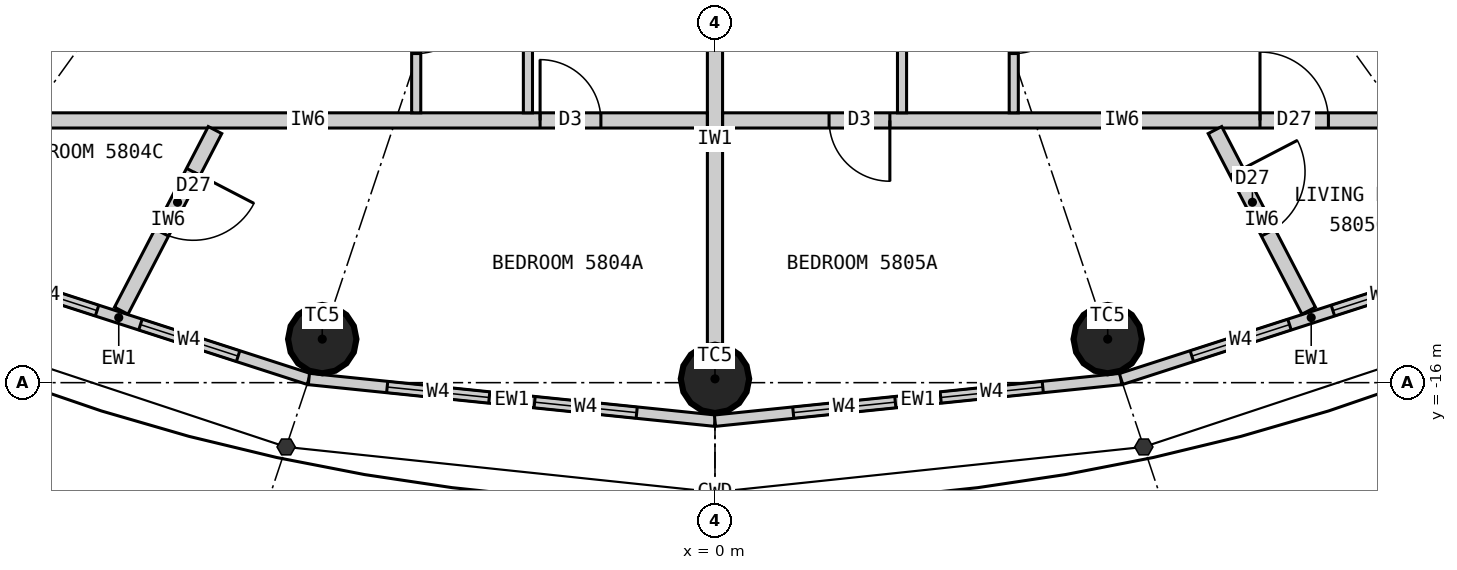
"""IFC4 building model, lengths in metres.
Left out: names, types, materials, properties, quantities, classifications, styles, units other than length and angle.
Written with IfcOpenShell. Run it as: python <this file> out.ifc"""

import sys

from ifc_helpers import new_model, si_unit, direction, frame, frame_2d, origin, origin_2d, place, context, subcontext, project, spatial, rectangle, circle, extrude, element, fill, save


model = new_model("IFC4")
c1 = context("Model", 3, precision=1e-05, world=origin(), true_north=direction((0.0, 1.0)))
c2 = subcontext(c1, "Body", "Model", "MODEL_VIEW")
j1 = project(units=[si_unit("LENGTHUNIT", "METRE"), si_unit("PLANEANGLEUNIT", "RADIAN")], contexts=[c1])
p1 = place(None, origin())
s1 = spatial("IfcSite", under=j1, at=p1, CompositionType="ELEMENT")
p2 = place(p1, origin())
s2 = spatial("IfcBuilding", under=s1, at=p2, CompositionType="ELEMENT")
p3 = place(p2, frame((0.0, 0.0, 216.0)))
s3 = spatial("IfcBuildingStorey", under=s2, at=p3, CompositionType="ELEMENT", Elevation=216.0)
for number, where, z_axis, x_axis in (
    (1, (-5.167, -15.427, 0.0), (0.0, 0.0, 1.0), (1.0, 0.0, 0.0)),
    (2, (0.0, -15.95, 0.0), (0.0, 0.0, 1.0), (1.0, 0.0, 0.0)),
    (3, (5.167, -15.427, 0.0), (0.0, 0.0, 1.0), (1.0, 0.0, 0.0)),
):
    element("IfcColumn", number, at=place(p3, frame(where, z_axis=z_axis, x_axis=x_axis)), inside=s3, PredefinedType="COLUMN", context=c2, shape_type="SweptSolid", body=[
        extrude(circle(Radius=0.45, at=origin_2d()), origin(), (0.0, 0.0, 1.0), 3.3),
    ])
p4 = place(p3, frame((-10.346, -14.336, 0.0), z_axis=(0.0, 0.0, 1.0), x_axis=(0.951644702515, -0.307200846638, 0.0)))
e4 = element("IfcWall", 4, at=p4, inside=s3, PredefinedType="ELEMENTEDWALL", context=c2, shape_type="SweptSolid", body=[
    extrude(rectangle(XDim=5.258, YDim=0.15, at=frame_2d((2.629, 0.0))), origin(), (0.0, 0.0, 1.0), 3.12),
])
p5 = place(p4, frame((0.979, 0.0, 0.9)))
e5 = element("IfcOpeningElement", 5, at=p5, cuts=e4, PredefinedType="OPENING", context=c2, shape_type="SweptSolid", body=[
    extrude(rectangle(XDim=1.35, YDim=1.9, at=frame_2d((0.675, 0.95))), frame((0.0, 0.085, 0.0), z_axis=(0.0, -1.0, 0.0), x_axis=(1.0, 0.0, 0.0)), (0.0, 0.0, 1.0), 0.17),
])
p6 = place(p4, frame((2.929, 0.0, 0.9)))
e6 = element("IfcOpeningElement", 6, at=p6, cuts=e4, PredefinedType="OPENING", context=c2, shape_type="SweptSolid", body=[
    extrude(rectangle(XDim=1.35, YDim=1.9, at=frame_2d((0.675, 0.95))), frame((0.0, 0.085, 0.0), z_axis=(0.0, -1.0, 0.0), x_axis=(1.0, 0.0, 0.0)), (0.0, 0.0, 1.0), 0.17),
])
p7 = place(p3, frame((-5.343, -15.952, 0.0), z_axis=(0.0, 0.0, 1.0), x_axis=(0.994774574972, -0.102095763818, 0.0)))
e7 = element("IfcWall", 7, at=p7, inside=s3, PredefinedType="ELEMENTEDWALL", context=c2, shape_type="SweptSolid", body=[
    extrude(rectangle(XDim=5.371, YDim=0.15, at=frame_2d((2.686, 0.0))), origin(), (0.0, 0.0, 1.0), 3.12),
])
p8 = place(p7, frame((1.035, 0.0, 0.9)))
e8 = element("IfcOpeningElement", 8, at=p8, cuts=e7, PredefinedType="OPENING", context=c2, shape_type="SweptSolid", body=[
    extrude(rectangle(XDim=1.35, YDim=1.9, at=frame_2d((0.675, 0.95))), frame((0.0, 0.085, 0.0), z_axis=(0.0, -1.0, 0.0), x_axis=(1.0, 0.0, 0.0)), (0.0, 0.0, 1.0), 0.17),
])
p9 = place(p7, frame((2.985, 0.0, 0.9)))
e9 = element("IfcOpeningElement", 9, at=p9, cuts=e7, PredefinedType="OPENING", context=c2, shape_type="SweptSolid", body=[
    extrude(rectangle(XDim=1.35, YDim=1.9, at=frame_2d((0.675, 0.95))), frame((0.0, 0.085, 0.0), z_axis=(0.0, -1.0, 0.0), x_axis=(1.0, 0.0, 0.0)), (0.0, 0.0, 1.0), 0.17),
])
p10 = place(p3, frame((0.0, -16.5, 0.0), z_axis=(0.0, 0.0, 1.0), x_axis=(0.994774574972, 0.102095763818, 0.0)))
e10 = element("IfcWall", 10, at=p10, inside=s3, PredefinedType="ELEMENTEDWALL", context=c2, shape_type="SweptSolid", body=[
    extrude(rectangle(XDim=5.371, YDim=0.15, at=frame_2d((2.686, 0.0))), origin(), (0.0, 0.0, 1.0), 3.12),
])
p11 = place(p10, frame((1.035, 0.0, 0.9)))
e11 = element("IfcOpeningElement", 11, at=p11, cuts=e10, PredefinedType="OPENING", context=c2, shape_type="SweptSolid", body=[
    extrude(rectangle(XDim=1.35, YDim=1.9, at=frame_2d((0.675, 0.95))), frame((0.0, 0.085, 0.0), z_axis=(0.0, -1.0, 0.0), x_axis=(1.0, 0.0, 0.0)), (0.0, 0.0, 1.0), 0.17),
])
p12 = place(p10, frame((2.985, 0.0, 0.9)))
e12 = element("IfcOpeningElement", 12, at=p12, cuts=e10, PredefinedType="OPENING", context=c2, shape_type="SweptSolid", body=[
    extrude(rectangle(XDim=1.35, YDim=1.9, at=frame_2d((0.675, 0.95))), frame((0.0, 0.085, 0.0), z_axis=(0.0, -1.0, 0.0), x_axis=(1.0, 0.0, 0.0)), (0.0, 0.0, 1.0), 0.17),
])
p13 = place(p3, frame((5.343, -15.952, 0.0), z_axis=(0.0, 0.0, 1.0), x_axis=(0.951644702515, 0.307200846638, 0.0)))
e13 = element("IfcWall", 13, at=p13, inside=s3, PredefinedType="ELEMENTEDWALL", context=c2, shape_type="SweptSolid", body=[
    extrude(rectangle(XDim=5.258, YDim=0.15, at=frame_2d((2.629, 0.0))), origin(), (0.0, 0.0, 1.0), 3.12),
])
p14 = place(p13, frame((0.979, 0.0, 0.9)))
e14 = element("IfcOpeningElement", 14, at=p14, cuts=e13, PredefinedType="OPENING", context=c2, shape_type="SweptSolid", body=[
    extrude(rectangle(XDim=1.35, YDim=1.9, at=frame_2d((0.675, 0.95))), frame((0.0, 0.085, 0.0), z_axis=(0.0, -1.0, 0.0), x_axis=(1.0, 0.0, 0.0)), (0.0, 0.0, 1.0), 0.17),
])
p15 = place(p13, frame((2.929, 0.0, 0.9)))
e15 = element("IfcOpeningElement", 15, at=p15, cuts=e13, PredefinedType="OPENING", context=c2, shape_type="SweptSolid", body=[
    extrude(rectangle(XDim=1.35, YDim=1.9, at=frame_2d((0.675, 0.95))), frame((0.0, 0.085, 0.0), z_axis=(0.0, -1.0, 0.0), x_axis=(1.0, 0.0, 0.0)), (0.0, 0.0, 1.0), 0.17),
])
p16 = place(p3, frame((0.0, -10.1, 0.0), z_axis=(0.0, 0.0, 1.0), x_axis=(0.0, -1.0, 0.0)))
e16 = element("IfcWall", 16, at=p16, inside=s3, PredefinedType="PARTITIONING", context=c2, shape_type="SweptSolid", body=[
    extrude(rectangle(XDim=5.4, YDim=0.2, at=frame_2d((2.7, 0.0))), origin(), (0.0, 0.0, 1.0), 2.42),
])
p17 = place(p3, frame((-10.609, -12.55, 0.0), z_axis=(0.0, 0.0, 1.0), x_axis=(1.0, 0.0, 0.0)))
e17 = element("IfcWall", 17, at=p17, inside=s3, PredefinedType="PARTITIONING", context=c2, shape_type="SweptSolid", body=[
    extrude(rectangle(XDim=10.508, YDim=0.2, at=frame_2d((5.254, 0.0))), origin(), (0.0, 0.0, 1.0), 3.12),
])
p18 = place(p17, frame((8.308, 0.0, 0.0)))
e18 = element("IfcOpeningElement", 18, at=p18, cuts=e17, PredefinedType="OPENING", context=c2, shape_type="SweptSolid", body=[
    extrude(rectangle(XDim=0.8, YDim=2.1, at=frame_2d((0.4, 1.05))), frame((0.0, 0.11, 0.0), z_axis=(0.0, -1.0, 0.0), x_axis=(1.0, 0.0, 0.0)), (0.0, 0.0, 1.0), 0.22),
])
p19 = place(p3, frame((-6.578, -12.677, 0.0), z_axis=(0.0, 0.0, 1.0), x_axis=(-0.460620531465, -0.887597164255, 0.0)))
e19 = element("IfcWall", 19, at=p19, inside=s3, PredefinedType="PARTITIONING", context=c2, shape_type="SweptSolid", body=[
    extrude(rectangle(XDim=2.678, YDim=0.2, at=frame_2d((1.339, 0.0))), origin(), (0.0, 0.0, 1.0), 3.12),
])
p20 = place(p19, frame((0.62, 0.0, 0.0)))
e20 = element("IfcOpeningElement", 20, at=p20, cuts=e19, PredefinedType="OPENING", context=c2, shape_type="SweptSolid", body=[
    extrude(rectangle(XDim=0.9, YDim=2.1, at=frame_2d((0.45, 1.05))), frame((0.0, 0.11, 0.0), z_axis=(0.0, -1.0, 0.0), x_axis=(1.0, 0.0, 0.0)), (0.0, 0.0, 1.0), 0.22),
])
p21 = place(p3, frame((-3.931, -10.1, 0.0), z_axis=(0.0, 0.0, 1.0), x_axis=(0.0, -1.0, 0.0)))
e21 = element("IfcWall", 21, at=p21, inside=s3, PredefinedType="PARTITIONING", context=c2, shape_type="SweptSolid", body=[
    extrude(rectangle(XDim=2.35, YDim=0.12, at=frame_2d((1.175, 0.0))), origin(), (0.0, 0.0, 1.0), 3.12),
])
p22 = place(p21, frame((0.77, 0.0, 0.0)))
e22 = element("IfcOpeningElement", 22, at=p22, cuts=e21, PredefinedType="OPENING", context=c2, shape_type="SweptSolid", body=[
    extrude(rectangle(XDim=0.8, YDim=2.1, at=frame_2d((0.4, 1.05))), frame((0.0, 0.07, 0.0), z_axis=(0.0, -1.0, 0.0), x_axis=(1.0, 0.0, 0.0)), (0.0, 0.0, 1.0), 0.14),
])
p23 = place(p3, frame((-2.461, -10.1, 0.0), z_axis=(0.0, 0.0, 1.0), x_axis=(0.0, -1.0, 0.0)))
e23 = element("IfcWall", 23, at=p23, inside=s3, PredefinedType="PARTITIONING", context=c2, shape_type="SweptSolid", body=[
    extrude(rectangle(XDim=2.35, YDim=0.12, at=frame_2d((1.175, 0.0))), origin(), (0.0, 0.0, 1.0), 3.12),
])
p24 = place(p3, frame((0.101, -12.55, 0.0), z_axis=(0.0, 0.0, 1.0), x_axis=(1.0, 0.0, 0.0)))
e24 = element("IfcWall", 24, at=p24, inside=s3, PredefinedType="PARTITIONING", context=c2, shape_type="SweptSolid", body=[
    extrude(rectangle(XDim=10.508, YDim=0.2, at=frame_2d((5.254, 0.0))), origin(), (0.0, 0.0, 1.0), 3.12),
])
p25 = place(p24, frame((1.4, 0.0, 0.0)))
e25 = element("IfcOpeningElement", 25, at=p25, cuts=e24, PredefinedType="OPENING", context=c2, shape_type="SweptSolid", body=[
    extrude(rectangle(XDim=0.8, YDim=2.1, at=frame_2d((0.4, 1.05))), frame((0.0, 0.11, 0.0), z_axis=(0.0, -1.0, 0.0), x_axis=(1.0, 0.0, 0.0)), (0.0, 0.0, 1.0), 0.22),
])
p26 = place(p24, frame((7.07, 0.0, 0.0)))
e26 = element("IfcOpeningElement", 26, at=p26, cuts=e24, PredefinedType="OPENING", context=c2, shape_type="SweptSolid", body=[
    extrude(rectangle(XDim=0.9, YDim=2.1, at=frame_2d((0.45, 1.05))), frame((0.0, 0.11, 0.0), z_axis=(0.0, -1.0, 0.0), x_axis=(1.0, 0.0, 0.0)), (0.0, 0.0, 1.0), 0.22),
])
p27 = place(p3, frame((6.578, -12.677, 0.0), z_axis=(0.0, 0.0, 1.0), x_axis=(0.460620531465, -0.887597164255, 0.0)))
e27 = element("IfcWall", 27, at=p27, inside=s3, PredefinedType="PARTITIONING", context=c2, shape_type="SweptSolid", body=[
    extrude(rectangle(XDim=2.678, YDim=0.2, at=frame_2d((1.339, 0.0))), origin(), (0.0, 0.0, 1.0), 3.12),
])
p28 = place(p27, frame((0.62, 0.0, 0.0)))
e28 = element("IfcOpeningElement", 28, at=p28, cuts=e27, PredefinedType="OPENING", context=c2, shape_type="SweptSolid", body=[
    extrude(rectangle(XDim=0.9, YDim=2.1, at=frame_2d((0.45, 1.05))), frame((0.0, 0.11, 0.0), z_axis=(0.0, -1.0, 0.0), x_axis=(1.0, 0.0, 0.0)), (0.0, 0.0, 1.0), 0.22),
])
p29 = place(p3, frame((2.461, -10.1, 0.0), z_axis=(0.0, 0.0, 1.0), x_axis=(0.0, -1.0, 0.0)))
e29 = element("IfcWall", 29, at=p29, inside=s3, PredefinedType="PARTITIONING", context=c2, shape_type="SweptSolid", body=[
    extrude(rectangle(XDim=2.35, YDim=0.12, at=frame_2d((1.175, 0.0))), origin(), (0.0, 0.0, 1.0), 3.12),
])
p30 = place(p3, frame((3.931, -10.1, 0.0), z_axis=(0.0, 0.0, 1.0), x_axis=(0.0, -1.0, 0.0)))
e30 = element("IfcWall", 30, at=p30, inside=s3, PredefinedType="PARTITIONING", context=c2, shape_type="SweptSolid", body=[
    extrude(rectangle(XDim=2.35, YDim=0.12, at=frame_2d((1.175, 0.0))), origin(), (0.0, 0.0, 1.0), 3.12),
])
p31 = place(p30, frame((0.77, 0.0, 0.0)))
e31 = element("IfcOpeningElement", 31, at=p31, cuts=e30, PredefinedType="OPENING", context=c2, shape_type="SweptSolid", body=[
    extrude(rectangle(XDim=0.8, YDim=2.1, at=frame_2d((0.4, 1.05))), frame((0.0, 0.07, 0.0), z_axis=(0.0, -1.0, 0.0), x_axis=(1.0, 0.0, 0.0)), (0.0, 0.0, 1.0), 0.14),
])
p32 = place(p5, origin())
e32 = element("IfcWindow", 32, at=p32, inside=s3, PartitioningType="SINGLE_PANEL", PredefinedType="WINDOW", context=c2, shape_type="SweptSolid", body=[
    extrude(rectangle(XDim=1.35, YDim=1.9, at=frame_2d((0.675, 0.95))), frame((0.0, 0.03, 0.0), z_axis=(0.0, -1.0, 0.0), x_axis=(1.0, 0.0, 0.0)), (0.0, 0.0, 1.0), 0.06),
])
fill(e5, e32)
p33 = place(p6, origin())
e33 = element("IfcWindow", 33, at=p33, inside=s3, PartitioningType="SINGLE_PANEL", PredefinedType="WINDOW", context=c2, shape_type="SweptSolid", body=[
    extrude(rectangle(XDim=1.35, YDim=1.9, at=frame_2d((0.675, 0.95))), frame((0.0, 0.03, 0.0), z_axis=(0.0, -1.0, 0.0), x_axis=(1.0, 0.0, 0.0)), (0.0, 0.0, 1.0), 0.06),
])
fill(e6, e33)
p34 = place(p8, origin())
e34 = element("IfcWindow", 34, at=p34, inside=s3, PartitioningType="SINGLE_PANEL", PredefinedType="WINDOW", context=c2, shape_type="SweptSolid", body=[
    extrude(rectangle(XDim=1.35, YDim=1.9, at=frame_2d((0.675, 0.95))), frame((0.0, 0.03, 0.0), z_axis=(0.0, -1.0, 0.0), x_axis=(1.0, 0.0, 0.0)), (0.0, 0.0, 1.0), 0.06),
])
fill(e8, e34)
p35 = place(p9, origin())
e35 = element("IfcWindow", 35, at=p35, inside=s3, PartitioningType="SINGLE_PANEL", PredefinedType="WINDOW", context=c2, shape_type="SweptSolid", body=[
    extrude(rectangle(XDim=1.35, YDim=1.9, at=frame_2d((0.675, 0.95))), frame((0.0, 0.03, 0.0), z_axis=(0.0, -1.0, 0.0), x_axis=(1.0, 0.0, 0.0)), (0.0, 0.0, 1.0), 0.06),
])
fill(e9, e35)
p36 = place(p11, origin())
e36 = element("IfcWindow", 36, at=p36, inside=s3, PartitioningType="SINGLE_PANEL", PredefinedType="WINDOW", context=c2, shape_type="SweptSolid", body=[
    extrude(rectangle(XDim=1.35, YDim=1.9, at=frame_2d((0.675, 0.95))), frame((0.0, 0.03, 0.0), z_axis=(0.0, -1.0, 0.0), x_axis=(1.0, 0.0, 0.0)), (0.0, 0.0, 1.0), 0.06),
])
fill(e11, e36)
p37 = place(p12, origin())
e37 = element("IfcWindow", 37, at=p37, inside=s3, PartitioningType="SINGLE_PANEL", PredefinedType="WINDOW", context=c2, shape_type="SweptSolid", body=[
    extrude(rectangle(XDim=1.35, YDim=1.9, at=frame_2d((0.675, 0.95))), frame((0.0, 0.03, 0.0), z_axis=(0.0, -1.0, 0.0), x_axis=(1.0, 0.0, 0.0)), (0.0, 0.0, 1.0), 0.06),
])
fill(e12, e37)
p38 = place(p14, origin())
e38 = element("IfcWindow", 38, at=p38, inside=s3, PartitioningType="SINGLE_PANEL", PredefinedType="WINDOW", context=c2, shape_type="SweptSolid", body=[
    extrude(rectangle(XDim=1.35, YDim=1.9, at=frame_2d((0.675, 0.95))), frame((0.0, 0.03, 0.0), z_axis=(0.0, -1.0, 0.0), x_axis=(1.0, 0.0, 0.0)), (0.0, 0.0, 1.0), 0.06),
])
fill(e14, e38)
p39 = place(p15, origin())
e39 = element("IfcWindow", 39, at=p39, inside=s3, PartitioningType="SINGLE_PANEL", PredefinedType="WINDOW", context=c2, shape_type="SweptSolid", body=[
    extrude(rectangle(XDim=1.35, YDim=1.9, at=frame_2d((0.675, 0.95))), frame((0.0, 0.03, 0.0), z_axis=(0.0, -1.0, 0.0), x_axis=(1.0, 0.0, 0.0)), (0.0, 0.0, 1.0), 0.06),
])
fill(e15, e39)
p40 = place(p22, origin())
e40 = element("IfcDoor", 40, at=p40, inside=s3, OperationType="SINGLE_SWING_LEFT", PredefinedType="DOOR", context=c2, shape_type="SweptSolid", body=[
    extrude(rectangle(XDim=0.8, YDim=2.1, at=frame_2d((0.4, 1.05))), frame((0.0, 0.025, 0.0), z_axis=(0.0, -1.0, 0.0), x_axis=(1.0, 0.0, 0.0)), (0.0, 0.0, 1.0), 0.05),
])
fill(e22, e40)
p41 = place(p18, origin())
e41 = element("IfcDoor", 41, at=p41, inside=s3, OperationType="SINGLE_SWING_LEFT", PredefinedType="DOOR", context=c2, shape_type="SweptSolid", body=[
    extrude(rectangle(XDim=0.8, YDim=2.1, at=frame_2d((0.4, 1.05))), frame((0.0, 0.025, 0.0), z_axis=(0.0, -1.0, 0.0), x_axis=(1.0, 0.0, 0.0)), (0.0, 0.0, 1.0), 0.05),
])
fill(e18, e41)
p42 = place(p20, origin())
e42 = element("IfcDoor", 42, at=p42, inside=s3, OperationType="SINGLE_SWING_LEFT", PredefinedType="DOOR", context=c2, shape_type="SweptSolid", body=[
    extrude(rectangle(XDim=0.9, YDim=2.1, at=frame_2d((0.45, 1.05))), frame((0.0, 0.025, 0.0), z_axis=(0.0, -1.0, 0.0), x_axis=(1.0, 0.0, 0.0)), (0.0, 0.0, 1.0), 0.05),
])
fill(e20, e42)
p43 = place(p25, origin())
e43 = element("IfcDoor", 43, at=p43, inside=s3, OperationType="SINGLE_SWING_RIGHT", PredefinedType="DOOR", context=c2, shape_type="SweptSolid", body=[
    extrude(rectangle(XDim=0.8, YDim=2.1, at=frame_2d((0.4, 1.05))), frame((0.0, 0.025, 0.0), z_axis=(0.0, -1.0, 0.0), x_axis=(1.0, 0.0, 0.0)), (0.0, 0.0, 1.0), 0.05),
])
fill(e25, e43)
p44 = place(p31, origin())
e44 = element("IfcDoor", 44, at=p44, inside=s3, OperationType="SINGLE_SWING_LEFT", PredefinedType="DOOR", context=c2, shape_type="SweptSolid", body=[
    extrude(rectangle(XDim=0.8, YDim=2.1, at=frame_2d((0.4, 1.05))), frame((0.0, 0.025, 0.0), z_axis=(0.0, -1.0, 0.0), x_axis=(1.0, 0.0, 0.0)), (0.0, 0.0, 1.0), 0.05),
])
fill(e31, e44)
p45 = place(p26, origin())
e45 = element("IfcDoor", 45, at=p45, inside=s3, OperationType="SINGLE_SWING_LEFT", PredefinedType="DOOR", context=c2, shape_type="SweptSolid", body=[
    extrude(rectangle(XDim=0.9, YDim=2.1, at=frame_2d((0.45, 1.05))), frame((0.0, 0.025, 0.0), z_axis=(0.0, -1.0, 0.0), x_axis=(1.0, 0.0, 0.0)), (0.0, 0.0, 1.0), 0.05),
])
fill(e26, e45)
p46 = place(p28, origin())
e46 = element("IfcDoor", 46, at=p46, inside=s3, OperationType="SINGLE_SWING_LEFT", PredefinedType="DOOR", context=c2, shape_type="SweptSolid", body=[
    extrude(rectangle(XDim=0.9, YDim=2.1, at=frame_2d((0.45, 1.05))), frame((0.0, 0.025, 0.0), z_axis=(0.0, -1.0, 0.0), x_axis=(1.0, 0.0, 0.0)), (0.0, 0.0, 1.0), 0.05),
])
fill(e28, e46)
save(model, sys.argv[1])
